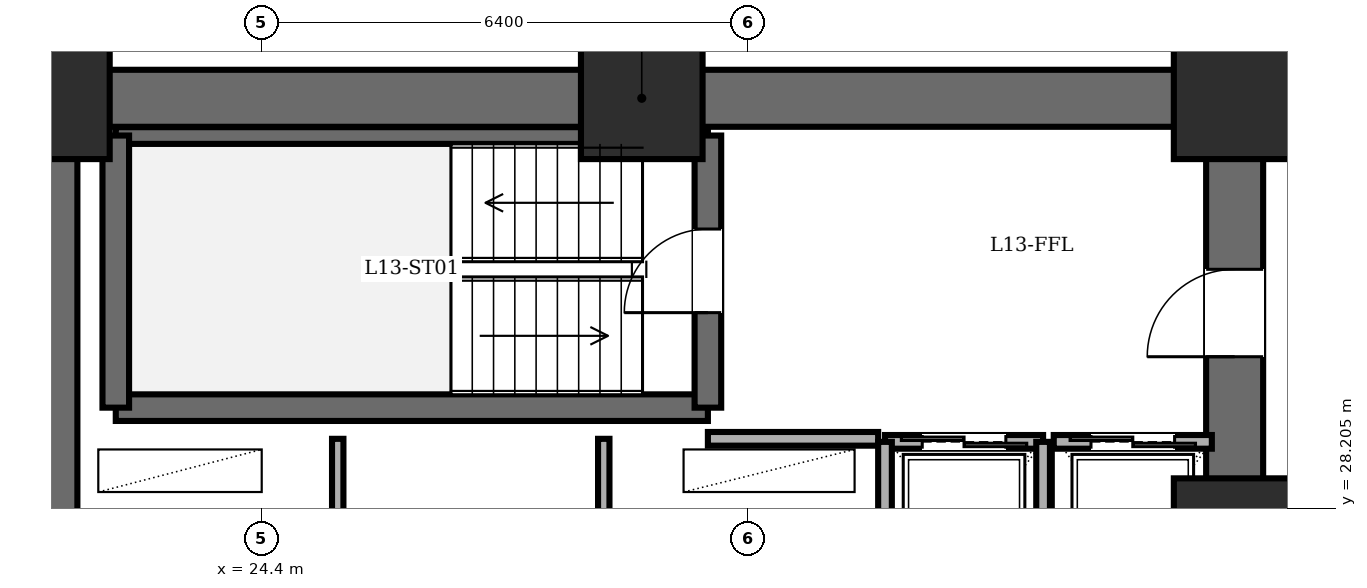
"""IFC4 building model, lengths in metres.
Left out: names, types, materials, properties, quantities, classifications, styles, units other than length and angle.
Written with IfcOpenShell. Run it as: python <this file> out.ifc"""

import sys

from ifc_helpers import new_model, si_unit, direction, frame, frame_2d, origin, origin_2d, place, context, subcontext, project, spatial, rectangle, extrude, element, fill, save


model = new_model("IFC4")
c1 = context("Model", 3, precision=1e-05, world=origin(), true_north=direction((0.0, 1.0)))
c2 = subcontext(c1, "Body", "Model", "MODEL_VIEW")
j1 = project(units=[si_unit("LENGTHUNIT", "METRE"), si_unit("PLANEANGLEUNIT", "RADIAN")], contexts=[c1])
p1 = place(None, origin())
s1 = spatial("IfcSite", under=j1, at=p1, CompositionType="ELEMENT")
p2 = place(p1, origin())
s2 = spatial("IfcBuilding", under=s1, at=p2, CompositionType="ELEMENT")
p3 = place(p2, frame((0.0, 0.0, 50.4)))
s3 = spatial("IfcBuildingStorey", under=s2, at=p3, CompositionType="ELEMENT", Elevation=50.4)
for number, where, z_axis, x_axis in (
    (1, (37.2, 27.8, 0.0), (0.0, 0.0, 1.0), (1.0, 0.0, 0.0)),
    (2, (37.2, 33.6, 0.0), (0.0, 0.0, 1.0), (1.0, 0.0, 0.0)),
    (3, (29.4, 33.6, 0.0), (0.0, 0.0, 1.0), (1.0, 0.0, 0.0)),
    (4, (21.6, 33.6, 0.0), (0.0, 0.0, 1.0), (1.0, 0.0, 0.0)),
):
    element("IfcColumn", number, at=place(p3, frame(where, z_axis=z_axis, x_axis=x_axis)), inside=s3, PredefinedType="COLUMN", context=c2, shape_type="SweptSolid", body=[
        extrude(rectangle(XDim=1.6, YDim=1.6, at=origin_2d()), origin(), (0.0, 0.0, 1.0), 3.6),
    ])
p4 = place(p3, frame((21.6, 14.4, 0.0), z_axis=(0.0, 0.0, 1.0), x_axis=(0.0, 1.0, 0.0)))
e5 = element("IfcWall", 5, at=p4, inside=s3, PredefinedType="SHEAR", context=c2, shape_type="SweptSolid", body=[
    extrude(rectangle(XDim=19.2, YDim=0.75, at=frame_2d((9.6, 0.0))), origin(), (0.0, 0.0, 1.0), 3.4),
])
p5 = place(p3, frame((21.6, 33.6, 0.0), z_axis=(0.0, 0.0, 1.0), x_axis=(1.0, 0.0, 0.0)))
e6 = element("IfcWall", 6, at=p5, inside=s3, PredefinedType="SHEAR", context=c2, shape_type="SweptSolid", body=[
    extrude(rectangle(XDim=15.6, YDim=0.75, at=frame_2d((7.8, 0.0))), origin(), (0.0, 0.0, 1.0), 3.4),
])
p6 = place(p3, frame((37.2, 14.4, 0.0), z_axis=(0.0, 0.0, 1.0), x_axis=(0.0, 1.0, 0.0)))
e7 = element("IfcWall", 7, at=p6, inside=s3, PredefinedType="SHEAR", context=c2, shape_type="SweptSolid", body=[
    extrude(rectangle(XDim=19.2, YDim=0.75, at=frame_2d((9.6, 0.0))), origin(), (0.0, 0.0, 1.0), 3.4),
])
p7 = place(p6, frame((15.8, 0.0, 0.0)))
e8 = element("IfcOpeningElement", 8, at=p7, cuts=e7, PredefinedType="OPENING", context=c2, shape_type="SweptSolid", body=[
    extrude(rectangle(XDim=1.15, YDim=2.15, at=frame_2d((0.575, 1.075))), frame((0.0, 0.385, 0.0), z_axis=(0.0, -1.0, 0.0), x_axis=(1.0, 0.0, 0.0)), (0.0, 0.0, 1.0), 0.77),
])
p8 = place(p6, frame((3.6, 0.0, 0.0)))
e9 = element("IfcOpeningElement", 9, at=p8, cuts=e7, PredefinedType="OPENING", context=c2, shape_type="SweptSolid", body=[
    extrude(rectangle(XDim=1.1, YDim=2.15, at=frame_2d((0.55, 1.075))), frame((0.0, 0.385, 0.0), z_axis=(0.0, -1.0, 0.0), x_axis=(1.0, 0.0, 0.0)), (0.0, 0.0, 1.0), 0.77),
])
p9 = place(p6, frame((8.6, 0.0, 0.0)))
e10 = element("IfcOpeningElement", 10, at=p9, cuts=e7, PredefinedType="OPENING", context=c2, shape_type="SweptSolid", body=[
    extrude(rectangle(XDim=1.3, YDim=2.2, at=frame_2d((0.65, 1.1))), frame((0.0, 0.385, 0.0), z_axis=(0.0, -1.0, 0.0), x_axis=(1.0, 0.0, 0.0)), (0.0, 0.0, 1.0), 0.77),
])
p10 = place(p3, frame((22.48, 29.53, 0.0), z_axis=(0.0, 0.0, 1.0), x_axis=(1.0, 0.0, 0.0)))
e11 = element("IfcWall", 11, at=p10, inside=s3, PredefinedType="SOLIDWALL", context=c2, shape_type="SweptSolid", body=[
    extrude(rectangle(XDim=7.79, YDim=0.35, at=frame_2d((3.895, 0.0))), origin(), (0.0, 0.0, 1.0), 3.4),
])
p11 = place(p3, frame((22.48, 33.11, 0.0), z_axis=(0.0, 0.0, 1.0), x_axis=(1.0, 0.0, 0.0)))
e12 = element("IfcWall", 12, at=p11, inside=s3, PredefinedType="PARTITIONING", context=c2, shape_type="SweptSolid", body=[
    extrude(rectangle(XDim=7.79, YDim=0.22, at=frame_2d((3.895, 0.0))), origin(), (0.0, 0.0, 1.0), 3.4),
])
p12 = place(p3, frame((22.48, 29.53, 0.0), z_axis=(0.0, 0.0, 1.0), x_axis=(0.0, 1.0, 0.0)))
e13 = element("IfcWall", 13, at=p12, inside=s3, PredefinedType="SOLIDWALL", context=c2, shape_type="SweptSolid", body=[
    extrude(rectangle(XDim=3.58, YDim=0.35, at=frame_2d((1.79, 0.0))), origin(), (0.0, 0.0, 1.0), 3.4),
])
p13 = place(p3, frame((30.27, 29.53, 0.0), z_axis=(0.0, 0.0, 1.0), x_axis=(0.0, 1.0, 0.0)))
e14 = element("IfcWall", 14, at=p13, inside=s3, PredefinedType="SOLIDWALL", context=c2, shape_type="SweptSolid", body=[
    extrude(rectangle(XDim=3.58, YDim=0.35, at=frame_2d((1.79, 0.0))), origin(), (0.0, 0.0, 1.0), 3.4),
])
p14 = place(p13, frame((1.25, 0.0, 0.0)))
e15 = element("IfcOpeningElement", 15, at=p14, cuts=e14, PredefinedType="OPENING", context=c2, shape_type="SweptSolid", body=[
    extrude(rectangle(XDim=1.1, YDim=2.15, at=frame_2d((0.55, 1.075))), frame((0.0, 0.185, 0.0), z_axis=(0.0, -1.0, 0.0), x_axis=(1.0, 0.0, 0.0)), (0.0, 0.0, 1.0), 0.37),
])
p15 = place(p3, frame((30.27, 29.12, 0.0), z_axis=(0.0, 0.0, 1.0), x_axis=(1.0, 0.0, 0.0)))
e16 = element("IfcWall", 16, at=p15, inside=s3, PredefinedType="PARTITIONING", context=c2, shape_type="SweptSolid", body=[
    extrude(rectangle(XDim=2.24, YDim=0.18, at=frame_2d((1.12, 0.0))), origin(), (0.0, 0.0, 1.0), 3.4),
])
for number, where, z_axis, x_axis in (
    (17, (25.4, 27.6, 0.0), (0.0, 0.0, 1.0), (0.0, 1.0, 0.0)),
    (18, (28.9, 27.6, 0.0), (0.0, 0.0, 1.0), (0.0, 1.0, 0.0)),
):
    element("IfcWall", number, at=place(p3, frame(where, z_axis=z_axis, x_axis=x_axis)), inside=s3, PredefinedType="PARTITIONING", context=c2, shape_type="SweptSolid", body=[
        extrude(rectangle(XDim=1.52, YDim=0.15, at=frame_2d((0.76, 0.0))), origin(), (0.0, 0.0, 1.0), 3.4),
    ])
p16 = place(p3, frame((32.6, 29.08, 0.0), z_axis=(0.0, 0.0, 1.0), x_axis=(1.0, 0.0, 0.0)))
e19 = element("IfcWall", 19, at=p16, inside=s3, PredefinedType="PARTITIONING", context=c2, shape_type="SweptSolid", body=[
    extrude(rectangle(XDim=2.08, YDim=0.18, at=frame_2d((1.04, 0.0))), origin(), (0.0, 0.0, 1.0), 3.4),
])
p17 = place(p16, frame((0.49, 0.0, 0.0)))
e20 = element("IfcOpeningElement", 20, at=p17, cuts=e19, PredefinedType="OPENING", context=c2, shape_type="SweptSolid", body=[
    extrude(rectangle(XDim=1.1, YDim=2.2, at=frame_2d((0.55, 1.1))), frame((0.0, 0.1, 0.0), z_axis=(0.0, -1.0, 0.0), x_axis=(1.0, 0.0, 0.0)), (0.0, 0.0, 1.0), 0.2),
])
for number, where, z_axis, x_axis in (
    (21, (34.68, 26.35, 0.0), (0.0, 0.0, 1.0), (0.0, 1.0, 0.0)),
    (22, (32.6, 29.08, 0.0), (0.0, 0.0, 1.0), (0.0, -1.0, 0.0)),
):
    element("IfcWall", number, at=place(p3, frame(where, z_axis=z_axis, x_axis=x_axis)), inside=s3, PredefinedType="PARTITIONING", context=c2, shape_type="SweptSolid", body=[
        extrude(rectangle(XDim=2.73, YDim=0.18, at=frame_2d((1.365, 0.0))), origin(), (0.0, 0.0, 1.0), 3.4),
    ])
p18 = place(p3, frame((34.82, 29.08, 0.0), z_axis=(0.0, 0.0, 1.0), x_axis=(1.0, 0.0, 0.0)))
e23 = element("IfcWall", 23, at=p18, inside=s3, PredefinedType="PARTITIONING", context=c2, shape_type="SweptSolid", body=[
    extrude(rectangle(XDim=2.08, YDim=0.18, at=frame_2d((1.04, 0.0))), origin(), (0.0, 0.0, 1.0), 3.4),
])
p19 = place(p18, frame((0.49, 0.0, 0.0)))
e24 = element("IfcOpeningElement", 24, at=p19, cuts=e23, PredefinedType="OPENING", context=c2, shape_type="SweptSolid", body=[
    extrude(rectangle(XDim=1.1, YDim=2.2, at=frame_2d((0.55, 1.1))), frame((0.0, 0.1, 0.0), z_axis=(0.0, -1.0, 0.0), x_axis=(1.0, 0.0, 0.0)), (0.0, 0.0, 1.0), 0.2),
])
p20 = place(p14, origin())
e25 = element("IfcDoor", 25, at=p20, inside=s3, OperationType="SINGLE_SWING_LEFT", PredefinedType="DOOR", context=c2, shape_type="SweptSolid", body=[
    extrude(rectangle(XDim=1.1, YDim=2.15, at=frame_2d((0.55, 1.075))), frame((0.0, 0.025, 0.0), z_axis=(0.0, -1.0, 0.0), x_axis=(1.0, 0.0, 0.0)), (0.0, 0.0, 1.0), 0.05),
])
fill(e15, e25)
p21 = place(p7, origin())
e26 = element("IfcDoor", 26, at=p21, inside=s3, OperationType="SINGLE_SWING_LEFT", PredefinedType="DOOR", context=c2, shape_type="SweptSolid", body=[
    extrude(rectangle(XDim=1.15, YDim=2.15, at=frame_2d((0.575, 1.075))), frame((0.0, 0.025, 0.0), z_axis=(0.0, -1.0, 0.0), x_axis=(1.0, 0.0, 0.0)), (0.0, 0.0, 1.0), 0.05),
])
fill(e8, e26)
p22 = place(p17, origin())
e27 = element("IfcDoor", 27, at=p22, inside=s3, OperationType="DOUBLE_DOOR_SLIDING", PredefinedType="DOOR", context=c2, shape_type="SweptSolid", body=[
    extrude(rectangle(XDim=1.1, YDim=2.2, at=frame_2d((0.55, 1.1))), frame((0.0, 0.025, 0.0), z_axis=(0.0, -1.0, 0.0), x_axis=(1.0, 0.0, 0.0)), (0.0, 0.0, 1.0), 0.05),
])
fill(e20, e27)
p23 = place(p19, origin())
e28 = element("IfcDoor", 28, at=p23, inside=s3, OperationType="DOUBLE_DOOR_SLIDING", PredefinedType="DOOR", context=c2, shape_type="SweptSolid", body=[
    extrude(rectangle(XDim=1.1, YDim=2.2, at=frame_2d((0.55, 1.1))), frame((0.0, 0.025, 0.0), z_axis=(0.0, -1.0, 0.0), x_axis=(1.0, 0.0, 0.0)), (0.0, 0.0, 1.0), 0.05),
])
fill(e24, e28)
save(model, sys.argv[1])
